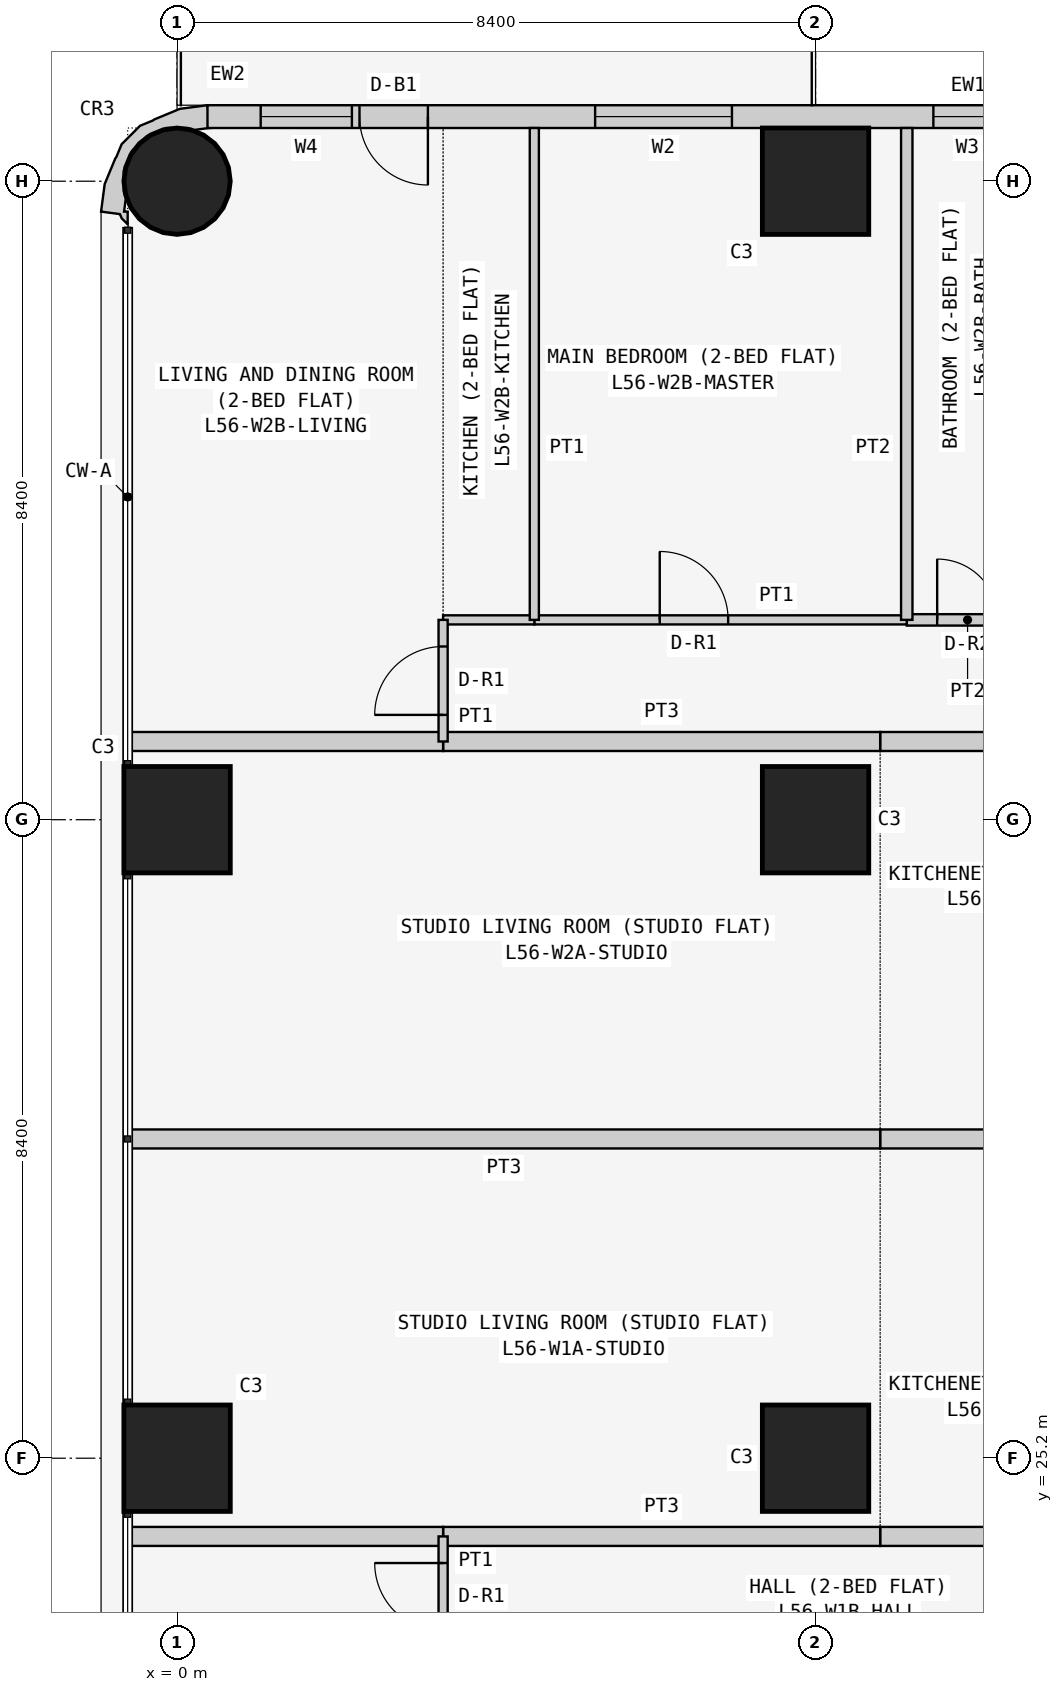
"""IFC4 building model, lengths in metres.
Left out: names, types, materials, properties, quantities, classifications, styles, units other than length and angle.
Written with IfcOpenShell. Run it as: python <this file> out.ifc"""

import sys

from ifc_helpers import new_model, si_unit, direction, frame, frame_2d, origin, origin_2d, place, context, subcontext, project, spatial, polyline, rectangle, circle, outline, extrude, element, fill, save


model = new_model("IFC4")
c1 = context("Model", 3, precision=1e-05, world=origin(), true_north=direction((0.0, 1.0)))
c2 = subcontext(c1, "Body", "Model", "MODEL_VIEW")
j1 = project(units=[si_unit("LENGTHUNIT", "METRE"), si_unit("PLANEANGLEUNIT", "RADIAN")], contexts=[c1])
p1 = place(None, origin())
s1 = spatial("IfcSite", under=j1, at=p1, CompositionType="ELEMENT")
p2 = place(p1, origin())
s2 = spatial("IfcBuilding", under=s1, at=p2, CompositionType="ELEMENT")
p3 = place(p2, frame((0.0, 0.0, 215.7)))
s3 = spatial("IfcBuildingStorey", under=s2, at=p3, CompositionType="ELEMENT", Elevation=215.7)
for number, where, z_axis, x_axis in (
    (1, (0.0, 25.2, 0.0), (0.0, 0.0, 1.0), (1.0, 0.0, 0.0)),
    (2, (0.0, 33.6, 0.0), (0.0, 0.0, 1.0), (1.0, 0.0, 0.0)),
):
    element("IfcColumn", number, at=place(p3, frame(where, z_axis=z_axis, x_axis=x_axis)), inside=s3, PredefinedType="COLUMN", context=c2, shape_type="SweptSolid", body=[
        extrude(rectangle(XDim=1.4, YDim=1.4, at=origin_2d()), origin(), (0.0, 0.0, 1.0), 3.6),
    ])
p4 = place(p3, frame((0.0, 42.0, 0.0), z_axis=(0.0, 0.0, 1.0), x_axis=(1.0, 0.0, 0.0)))
e3 = element("IfcColumn", 3, at=p4, inside=s3, PredefinedType="COLUMN", context=c2, shape_type="SweptSolid", body=[
    extrude(circle(Radius=0.7, at=origin_2d()), origin(), (0.0, 0.0, 1.0), 3.6),
])
for number, where, z_axis, x_axis in (
    (4, (8.4, 25.2, 0.0), (0.0, 0.0, 1.0), (1.0, 0.0, 0.0)),
    (5, (8.4, 33.6, 0.0), (0.0, 0.0, 1.0), (1.0, 0.0, 0.0)),
    (6, (8.4, 42.0, 0.0), (0.0, 0.0, 1.0), (1.0, 0.0, 0.0)),
):
    element("IfcColumn", number, at=place(p3, frame(where, z_axis=z_axis, x_axis=x_axis)), inside=s3, PredefinedType="COLUMN", context=c2, shape_type="SweptSolid", body=[
        extrude(rectangle(XDim=1.4, YDim=1.4, at=origin_2d()), origin(), (0.0, 0.0, 1.0), 3.6),
    ])
p5 = place(p3, frame((15.8, 42.85, 0.0), z_axis=(0.0, 0.0, 1.0), x_axis=(-1.0, 0.0, 0.0)))
e7 = element("IfcWall", 7, at=p5, inside=s3, PredefinedType="SOLIDWALL", context=c2, shape_type="SweptSolid", body=[
    extrude(rectangle(XDim=15.4, YDim=0.3, at=frame_2d((7.7, 0.0))), origin(), (0.0, 0.0, 1.0), 3.45),
])
p6 = place(p5, frame((1.2, 0.0, 0.9)))
e8 = element("IfcOpeningElement", 8, at=p6, cuts=e7, PredefinedType="OPENING", context=c2, shape_type="SweptSolid", body=[
    extrude(rectangle(XDim=1.8, YDim=1.5, at=frame_2d((0.9, 0.75))), frame((0.0, 0.16, 0.0), z_axis=(0.0, -1.0, 0.0), x_axis=(1.0, 0.0, 0.0)), (0.0, 0.0, 1.0), 0.32),
])
p7 = place(p5, frame((4.95, 0.0, 1.5)))
e9 = element("IfcOpeningElement", 9, at=p7, cuts=e7, PredefinedType="OPENING", context=c2, shape_type="SweptSolid", body=[
    extrude(rectangle(XDim=0.9, YDim=0.7, at=frame_2d((0.45, 0.35))), frame((0.0, 0.16, 0.0), z_axis=(0.0, -1.0, 0.0), x_axis=(1.0, 0.0, 0.0)), (0.0, 0.0, 1.0), 0.32),
])
p8 = place(p5, frame((8.5, 0.0, 0.9)))
e10 = element("IfcOpeningElement", 10, at=p8, cuts=e7, PredefinedType="OPENING", context=c2, shape_type="SweptSolid", body=[
    extrude(rectangle(XDim=1.8, YDim=1.5, at=frame_2d((0.9, 0.75))), frame((0.0, 0.16, 0.0), z_axis=(0.0, -1.0, 0.0), x_axis=(1.0, 0.0, 0.0)), (0.0, 0.0, 1.0), 0.32),
])
p9 = place(p5, frame((12.5, 0.0, 0.0)))
e11 = element("IfcOpeningElement", 11, at=p9, cuts=e7, PredefinedType="OPENING", context=c2, shape_type="SweptSolid", body=[
    extrude(rectangle(XDim=0.9, YDim=2.4, at=frame_2d((0.45, 1.2))), frame((0.0, 0.16, 0.0), z_axis=(0.0, -1.0, 0.0), x_axis=(1.0, 0.0, 0.0)), (0.0, 0.0, 1.0), 0.32),
])
p10 = place(p5, frame((13.5, 0.0, 0.9)))
e12 = element("IfcOpeningElement", 12, at=p10, cuts=e7, PredefinedType="OPENING", context=c2, shape_type="SweptSolid", body=[
    extrude(rectangle(XDim=1.2, YDim=1.5, at=frame_2d((0.6, 0.75))), frame((0.0, 0.16, 0.0), z_axis=(0.0, -1.0, 0.0), x_axis=(1.0, 0.0, 0.0)), (0.0, 0.0, 1.0), 0.32),
])
p11 = place(p3, frame((0.29, 42.724, 0.0), z_axis=(0.0, 0.0, 1.0), x_axis=(-0.898030234854, 0.439933741929, 0.0)))
e13 = element("IfcWall", 13, at=p11, inside=s3, PredefinedType="SOLIDWALL", context=c2, shape_type="SweptSolid", body=[
    extrude(outline(polyline([(-0.145, -0.044), (0.022, -0.296), (0.327, -0.094), (0.568, 0.18), (0.578, 0.199), (0.7, 0.338), (0.811, 0.661), (0.799, 0.846), (0.803, 0.866), (0.78, 1.231), (0.664, 1.577), (0.426, 1.497), (0.382, 1.536), (0.276, 1.572), (0.349, 1.423), (0.392, 1.444), (0.453, 1.261), (0.51, 1.211), (0.632, 0.961), (0.65, 0.683), (0.56, 0.419), (0.375, 0.21), (0.125, 0.087), (0.05, 0.082), (-0.127, -0.035), (-0.145, -0.044)])), origin(), (0.0, 0.0, 1.0), 3.45),
])
for number, where, z_axis, x_axis in (
    (14, (9.25, 24.171, 0.0), (0.0, 0.0, 1.0), (1.0, 0.0, 0.0)),
    (15, (13.4, 29.4, 0.0), (0.0, 0.0, 1.0), (-1.0, 0.0, 0.0)),
):
    element("IfcWall", number, at=place(p3, frame(where, z_axis=z_axis, x_axis=x_axis)), inside=s3, PredefinedType="PARTITIONING", context=c2, shape_type="SweptSolid", body=[
        extrude(rectangle(XDim=4.15, YDim=0.25, at=frame_2d((2.075, 0.0))), origin(), (0.0, 0.0, 1.0), 3.45),
    ])
p12 = place(p3, frame((3.5, 24.171, 0.0), z_axis=(0.0, 0.0, 1.0), x_axis=(1.0, 0.0, 0.0)))
e16 = element("IfcWall", 16, at=p12, inside=s3, PredefinedType="PARTITIONING", context=c2, shape_type="SweptSolid", body=[
    extrude(rectangle(XDim=5.75, YDim=0.25, at=frame_2d((2.875, 0.0))), origin(), (0.0, 0.0, 1.0), 3.45),
])
p13 = place(p3, frame((-0.65, 24.171, 0.0), z_axis=(0.0, 0.0, 1.0), x_axis=(1.0, 0.0, 0.0)))
e17 = element("IfcWall", 17, at=p13, inside=s3, PredefinedType="PARTITIONING", context=c2, shape_type="SweptSolid", body=[
    extrude(rectangle(XDim=4.15, YDim=0.25, at=frame_2d((2.075, 0.0))), origin(), (0.0, 0.0, 1.0), 3.45),
])
p14 = place(p3, frame((9.25, 29.4, 0.0), z_axis=(0.0, 0.0, 1.0), x_axis=(-1.0, 0.0, 0.0)))
e18 = element("IfcWall", 18, at=p14, inside=s3, PredefinedType="PARTITIONING", context=c2, shape_type="SweptSolid", body=[
    extrude(rectangle(XDim=9.9, YDim=0.25, at=frame_2d((4.95, 0.0))), origin(), (0.0, 0.0, 1.0), 3.45),
])
p15 = place(p3, frame((3.5, 24.171, 0.0), z_axis=(0.0, 0.0, 1.0), x_axis=(0.0, -1.0, 0.0)))
e19 = element("IfcWall", 19, at=p15, inside=s3, PredefinedType="PARTITIONING", context=c2, shape_type="SweptSolid", body=[
    extrude(rectangle(XDim=1.6, YDim=0.12, at=frame_2d((0.8, 0.0))), origin(), (0.0, 0.0, 1.0), 3.45),
])
p16 = place(p15, frame((0.35, 0.0, 0.0)))
e20 = element("IfcOpeningElement", 20, at=p16, cuts=e19, PredefinedType="OPENING", context=c2, shape_type="SweptSolid", body=[
    extrude(rectangle(XDim=0.9, YDim=2.1, at=frame_2d((0.45, 1.05))), frame((0.0, 0.07, 0.0), z_axis=(0.0, -1.0, 0.0), x_axis=(1.0, 0.0, 0.0)), (0.0, 0.0, 1.0), 0.14),
])
p17 = place(p3, frame((9.25, 34.629, 0.0), z_axis=(0.0, 0.0, 1.0), x_axis=(1.0, 0.0, 0.0)))
e21 = element("IfcWall", 21, at=p17, inside=s3, PredefinedType="PARTITIONING", context=c2, shape_type="SweptSolid", body=[
    extrude(rectangle(XDim=4.15, YDim=0.25, at=frame_2d((2.075, 0.0))), origin(), (0.0, 0.0, 1.0), 3.45),
])
p18 = place(p3, frame((3.5, 34.629, 0.0), z_axis=(0.0, 0.0, 1.0), x_axis=(1.0, 0.0, 0.0)))
e22 = element("IfcWall", 22, at=p18, inside=s3, PredefinedType="PARTITIONING", context=c2, shape_type="SweptSolid", body=[
    extrude(rectangle(XDim=5.75, YDim=0.25, at=frame_2d((2.875, 0.0))), origin(), (0.0, 0.0, 1.0), 3.45),
])
p19 = place(p3, frame((-0.65, 34.629, 0.0), z_axis=(0.0, 0.0, 1.0), x_axis=(1.0, 0.0, 0.0)))
e23 = element("IfcWall", 23, at=p19, inside=s3, PredefinedType="PARTITIONING", context=c2, shape_type="SweptSolid", body=[
    extrude(rectangle(XDim=4.15, YDim=0.25, at=frame_2d((2.075, 0.0))), origin(), (0.0, 0.0, 1.0), 3.45),
])
p20 = place(p3, frame((9.6, 36.229, 0.0), z_axis=(0.0, 0.0, 1.0), x_axis=(1.0, 0.0, 0.0)))
e24 = element("IfcWall", 24, at=p20, inside=s3, PredefinedType="PARTITIONING", context=c2, shape_type="SweptSolid", body=[
    extrude(rectangle(XDim=1.6, YDim=0.15, at=frame_2d((0.8, 0.0))), origin(), (0.0, 0.0, 1.0), 3.45),
])
p21 = place(p20, frame((0.4, 0.0, 0.0)))
e25 = element("IfcOpeningElement", 25, at=p21, cuts=e24, PredefinedType="OPENING", context=c2, shape_type="SweptSolid", body=[
    extrude(rectangle(XDim=0.8, YDim=2.1, at=frame_2d((0.4, 1.05))), frame((0.0, 0.085, 0.0), z_axis=(0.0, -1.0, 0.0), x_axis=(1.0, 0.0, 0.0)), (0.0, 0.0, 1.0), 0.17),
])
p22 = place(p3, frame((4.7, 36.229, 0.0), z_axis=(0.0, 0.0, 1.0), x_axis=(1.0, 0.0, 0.0)))
e26 = element("IfcWall", 26, at=p22, inside=s3, PredefinedType="PARTITIONING", context=c2, shape_type="SweptSolid", body=[
    extrude(rectangle(XDim=4.9, YDim=0.12, at=frame_2d((2.45, 0.0))), origin(), (0.0, 0.0, 1.0), 3.45),
])
p23 = place(p22, frame((1.65, 0.0, 0.0)))
e27 = element("IfcOpeningElement", 27, at=p23, cuts=e26, PredefinedType="OPENING", context=c2, shape_type="SweptSolid", body=[
    extrude(rectangle(XDim=0.9, YDim=2.1, at=frame_2d((0.45, 1.05))), frame((0.0, 0.07, 0.0), z_axis=(0.0, -1.0, 0.0), x_axis=(1.0, 0.0, 0.0)), (0.0, 0.0, 1.0), 0.14),
])
p24 = place(p3, frame((3.5, 36.229, 0.0), z_axis=(0.0, 0.0, 1.0), x_axis=(1.0, 0.0, 0.0)))
e28 = element("IfcWall", 28, at=p24, inside=s3, PredefinedType="PARTITIONING", context=c2, shape_type="SweptSolid", body=[
    extrude(rectangle(XDim=1.2, YDim=0.12, at=frame_2d((0.6, 0.0))), origin(), (0.0, 0.0, 1.0), 3.45),
])
p25 = place(p3, frame((3.5, 34.629, 0.0), z_axis=(0.0, 0.0, 1.0), x_axis=(0.0, 1.0, 0.0)))
e29 = element("IfcWall", 29, at=p25, inside=s3, PredefinedType="PARTITIONING", context=c2, shape_type="SweptSolid", body=[
    extrude(rectangle(XDim=1.6, YDim=0.12, at=frame_2d((0.8, 0.0))), origin(), (0.0, 0.0, 1.0), 3.45),
])
p26 = place(p25, frame((0.35, 0.0, 0.0)))
e30 = element("IfcOpeningElement", 30, at=p26, cuts=e29, PredefinedType="OPENING", context=c2, shape_type="SweptSolid", body=[
    extrude(rectangle(XDim=0.9, YDim=2.1, at=frame_2d((0.45, 1.05))), frame((0.0, 0.07, 0.0), z_axis=(0.0, -1.0, 0.0), x_axis=(1.0, 0.0, 0.0)), (0.0, 0.0, 1.0), 0.14),
])
p27 = place(p3, frame((9.6, 36.229, 0.0), z_axis=(0.0, 0.0, 1.0), x_axis=(0.0, 1.0, 0.0)))
e31 = element("IfcWall", 31, at=p27, inside=s3, PredefinedType="PARTITIONING", context=c2, shape_type="SweptSolid", body=[
    extrude(rectangle(XDim=6.471, YDim=0.15, at=frame_2d((3.235, 0.0))), origin(), (0.0, 0.0, 1.0), 3.45),
])
p28 = place(p3, frame((4.7, 36.229, 0.0), z_axis=(0.0, 0.0, 1.0), x_axis=(0.0, 1.0, 0.0)))
e32 = element("IfcWall", 32, at=p28, inside=s3, PredefinedType="PARTITIONING", context=c2, shape_type="SweptSolid", body=[
    extrude(rectangle(XDim=6.471, YDim=0.12, at=frame_2d((3.235, 0.0))), origin(), (0.0, 0.0, 1.0), 3.45),
])
p29 = place(p7, origin())
e33 = element("IfcWindow", 33, at=p29, inside=s3, PartitioningType="SINGLE_PANEL", PredefinedType="WINDOW", context=c2, shape_type="SweptSolid", body=[
    extrude(rectangle(XDim=0.9, YDim=0.7, at=frame_2d((0.45, 0.35))), frame((0.0, 0.03, 0.0), z_axis=(0.0, -1.0, 0.0), x_axis=(1.0, 0.0, 0.0)), (0.0, 0.0, 1.0), 0.06),
])
fill(e9, e33)
p30 = place(p8, origin())
e34 = element("IfcWindow", 34, at=p30, inside=s3, PartitioningType="SINGLE_PANEL", PredefinedType="WINDOW", context=c2, shape_type="SweptSolid", body=[
    extrude(rectangle(XDim=1.8, YDim=1.5, at=frame_2d((0.9, 0.75))), frame((0.0, 0.03, 0.0), z_axis=(0.0, -1.0, 0.0), x_axis=(1.0, 0.0, 0.0)), (0.0, 0.0, 1.0), 0.06),
])
fill(e10, e34)
p31 = place(p9, origin())
e35 = element("IfcDoor", 35, at=p31, inside=s3, OperationType="SINGLE_SWING_LEFT", PredefinedType="DOOR", context=c2, shape_type="SweptSolid", body=[
    extrude(rectangle(XDim=0.9, YDim=2.4, at=frame_2d((0.45, 1.2))), frame((0.0, 0.025, 0.0), z_axis=(0.0, -1.0, 0.0), x_axis=(1.0, 0.0, 0.0)), (0.0, 0.0, 1.0), 0.05),
])
fill(e11, e35)
p32 = place(p10, origin())
e36 = element("IfcWindow", 36, at=p32, inside=s3, PartitioningType="SINGLE_PANEL", PredefinedType="WINDOW", context=c2, shape_type="SweptSolid", body=[
    extrude(rectangle(XDim=1.2, YDim=1.5, at=frame_2d((0.6, 0.75))), frame((0.0, 0.03, 0.0), z_axis=(0.0, -1.0, 0.0), x_axis=(1.0, 0.0, 0.0)), (0.0, 0.0, 1.0), 0.06),
])
fill(e12, e36)
p33 = place(p16, frame((0.9, 0.0, 0.0), z_axis=(0.0, 0.0, 1.0), x_axis=(-1.0, 0.0, 0.0)))
e37 = element("IfcDoor", 37, at=p33, inside=s3, OperationType="SINGLE_SWING_RIGHT", PredefinedType="DOOR", context=c2, shape_type="SweptSolid", body=[
    extrude(rectangle(XDim=0.9, YDim=2.1, at=frame_2d((0.45, 1.05))), frame((0.0, 0.025, 0.0), z_axis=(0.0, -1.0, 0.0), x_axis=(1.0, 0.0, 0.0)), (0.0, 0.0, 1.0), 0.05),
])
fill(e20, e37)
p34 = place(p21, origin())
e38 = element("IfcDoor", 38, at=p34, inside=s3, OperationType="SINGLE_SWING_LEFT", PredefinedType="DOOR", context=c2, shape_type="SweptSolid", body=[
    extrude(rectangle(XDim=0.8, YDim=2.1, at=frame_2d((0.4, 1.05))), frame((0.0, 0.025, 0.0), z_axis=(0.0, -1.0, 0.0), x_axis=(1.0, 0.0, 0.0)), (0.0, 0.0, 1.0), 0.05),
])
fill(e25, e38)
p35 = place(p23, origin())
e39 = element("IfcDoor", 39, at=p35, inside=s3, OperationType="SINGLE_SWING_LEFT", PredefinedType="DOOR", context=c2, shape_type="SweptSolid", body=[
    extrude(rectangle(XDim=0.9, YDim=2.1, at=frame_2d((0.45, 1.05))), frame((0.0, 0.025, 0.0), z_axis=(0.0, -1.0, 0.0), x_axis=(1.0, 0.0, 0.0)), (0.0, 0.0, 1.0), 0.05),
])
fill(e27, e39)
p36 = place(p26, origin())
e40 = element("IfcDoor", 40, at=p36, inside=s3, OperationType="SINGLE_SWING_LEFT", PredefinedType="DOOR", context=c2, shape_type="SweptSolid", body=[
    extrude(rectangle(XDim=0.9, YDim=2.1, at=frame_2d((0.45, 1.05))), frame((0.0, 0.025, 0.0), z_axis=(0.0, -1.0, 0.0), x_axis=(1.0, 0.0, 0.0)), (0.0, 0.0, 1.0), 0.05),
])
fill(e30, e40)
save(model, sys.argv[1])
